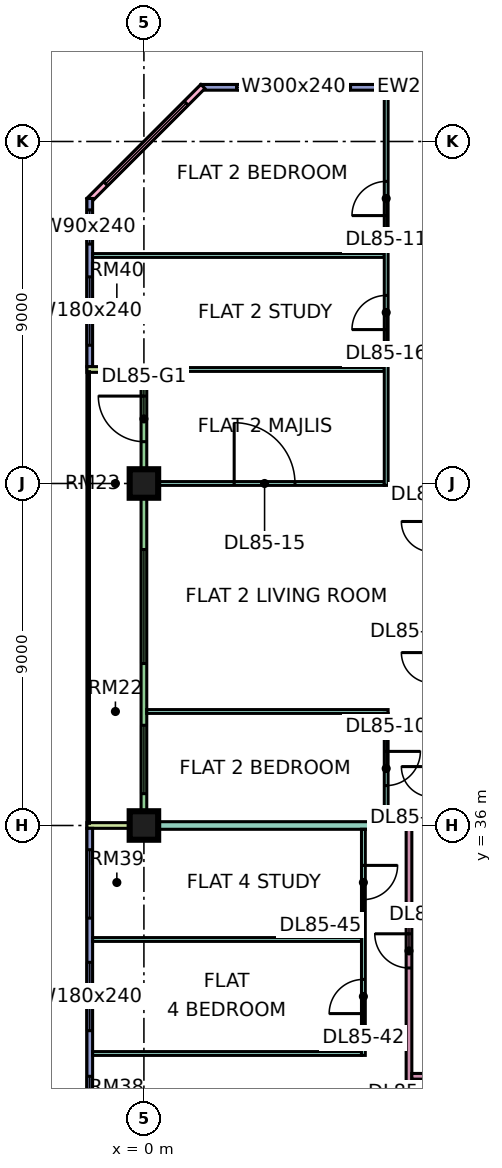
"""IFC4 building model, lengths in metres.
Left out: names, types, materials, properties, quantities, classifications, styles, units other than length and angle.
Written with IfcOpenShell. Run it as: python <this file> out.ifc"""

import sys

from ifc_helpers import new_model, si_unit, direction, frame, frame_2d, origin, origin_2d, place, context, subcontext, project, spatial, rectangle, extrude, element, fill, save


model = new_model("IFC4")
c1 = context("Model", 3, precision=1e-05, world=origin(), true_north=direction((0.0, 1.0)))
c2 = subcontext(c1, "Body", "Model", "MODEL_VIEW")
j1 = project(units=[si_unit("LENGTHUNIT", "METRE"), si_unit("PLANEANGLEUNIT", "RADIAN")], contexts=[c1])
p1 = place(None, origin())
s1 = spatial("IfcSite", under=j1, at=p1, CompositionType="ELEMENT")
p2 = place(p1, origin())
s2 = spatial("IfcBuilding", under=s1, at=p2, CompositionType="ELEMENT")
p3 = place(p2, frame((0.0, 0.0, 365.15)))
s3 = spatial("IfcBuildingStorey", under=s2, at=p3, CompositionType="ELEMENT", Elevation=365.15)
p4 = place(p3, frame((0.0, 36.0, 0.0), z_axis=(0.0, 0.0, 1.0), x_axis=(1.0, 0.0, 0.0)))
e1 = element("IfcColumn", 1, at=p4, inside=s3, PredefinedType="COLUMN", context=c2, shape_type="SweptSolid", body=[
    extrude(rectangle(XDim=0.75, YDim=0.75, at=origin_2d()), origin(), (0.0, 0.0, 1.0), 3.75),
])
p5 = place(p3, frame((0.0, 45.0, 0.0), z_axis=(0.0, 0.0, 1.0), x_axis=(1.0, 0.0, 0.0)))
e2 = element("IfcColumn", 2, at=p5, inside=s3, PredefinedType="COLUMN", context=c2, shape_type="SweptSolid", body=[
    extrude(rectangle(XDim=0.75, YDim=0.75, at=origin_2d()), origin(), (0.0, 0.0, 1.0), 3.75),
])
p6 = place(p3, frame((11.925, 55.425, 0.0), z_axis=(0.0, 0.0, 1.0), x_axis=(-1.0, 0.0, 0.0)))
e3 = element("IfcWall", 3, at=p6, inside=s3, PredefinedType="SOLIDWALL", context=c2, shape_type="SweptSolid", body=[
    extrude(rectangle(XDim=10.425, YDim=0.15, at=frame_2d((5.212, 0.0))), origin(), (0.0, 0.0, 1.0), 3.35),
])
p7 = place(p6, frame((0.675, 0.0, 0.45)))
e4 = element("IfcOpeningElement", 4, at=p7, cuts=e3, PredefinedType="OPENING", context=c2, shape_type="SweptSolid", body=[
    extrude(rectangle(XDim=3.0, YDim=2.4, at=frame_2d((1.5, 1.2))), frame((0.0, 0.085, 0.0), z_axis=(0.0, -1.0, 0.0), x_axis=(1.0, 0.0, 0.0)), (0.0, 0.0, 1.0), 0.17),
])
p8 = place(p6, frame((6.488, 0.0, 0.45)))
e5 = element("IfcOpeningElement", 5, at=p8, cuts=e3, PredefinedType="OPENING", context=c2, shape_type="SweptSolid", body=[
    extrude(rectangle(XDim=3.0, YDim=2.4, at=frame_2d((1.5, 1.2))), frame((0.0, 0.085, 0.0), z_axis=(0.0, -1.0, 0.0), x_axis=(1.0, 0.0, 0.0)), (0.0, 0.0, 1.0), 0.17),
])
p9 = place(p3, frame((1.553, 55.447, 0.0), z_axis=(0.0, 0.0, 1.0), x_axis=(-0.707106781187, -0.707106781187, 0.0)))
e6 = element("IfcWall", 6, at=p9, inside=s3, PredefinedType="SOLIDWALL", context=c2, shape_type="SweptSolid", body=[
    extrude(rectangle(XDim=4.243, YDim=0.15, at=frame_2d((2.121, 0.0))), origin(), (0.0, 0.0, 1.0), 3.35),
])
p10 = place(p9, frame((0.621, 0.0, 0.45)))
e7 = element("IfcOpeningElement", 7, at=p10, cuts=e6, PredefinedType="OPENING", context=c2, shape_type="SweptSolid", body=[
    extrude(rectangle(XDim=3.0, YDim=2.4, at=frame_2d((1.5, 1.2))), frame((0.0, 0.085, 0.0), z_axis=(0.0, -1.0, 0.0), x_axis=(1.0, 0.0, 0.0)), (0.0, 0.0, 1.0), 0.17),
])
p11 = place(p3, frame((-1.425, 52.5, 0.0), z_axis=(0.0, 0.0, 1.0), x_axis=(0.0, -1.0, 0.0)))
e8 = element("IfcWall", 8, at=p11, inside=s3, PredefinedType="SOLIDWALL", context=c2, shape_type="SweptSolid", body=[
    extrude(rectangle(XDim=4.425, YDim=0.15, at=frame_2d((2.212, 0.0))), origin(), (0.0, 0.0, 1.0), 3.35),
])
p12 = place(p11, frame((0.3, 0.0, 0.45)))
e9 = element("IfcOpeningElement", 9, at=p12, cuts=e8, PredefinedType="OPENING", context=c2, shape_type="SweptSolid", body=[
    extrude(rectangle(XDim=0.9, YDim=2.4, at=frame_2d((0.45, 1.2))), frame((0.0, 0.085, 0.0), z_axis=(0.0, -1.0, 0.0), x_axis=(1.0, 0.0, 0.0)), (0.0, 0.0, 1.0), 0.17),
])
p13 = place(p11, frame((2.062, 0.0, 0.45)))
e10 = element("IfcOpeningElement", 10, at=p13, cuts=e8, PredefinedType="OPENING", context=c2, shape_type="SweptSolid", body=[
    extrude(rectangle(XDim=1.8, YDim=2.4, at=frame_2d((0.9, 1.2))), frame((0.0, 0.085, 0.0), z_axis=(0.0, -1.0, 0.0), x_axis=(1.0, 0.0, 0.0)), (0.0, 0.0, 1.0), 0.17),
])
p14 = place(p3, frame((0.0, 47.925, 0.0), z_axis=(0.0, 0.0, 1.0), x_axis=(0.0, -1.0, 0.0)))
e11 = element("IfcWall", 11, at=p14, inside=s3, PredefinedType="SOLIDWALL", context=c2, shape_type="SweptSolid", body=[
    extrude(rectangle(XDim=11.85, YDim=0.15, at=frame_2d((5.925, 0.0))), origin(), (0.0, 0.0, 1.0), 3.35),
])
p15 = place(p14, frame((0.625, 0.0, 0.0)))
e12 = element("IfcOpeningElement", 12, at=p15, cuts=e11, PredefinedType="OPENING", context=c2, shape_type="SweptSolid", body=[
    extrude(rectangle(XDim=1.2, YDim=2.4, at=frame_2d((0.6, 1.2))), frame((0.0, 0.085, 0.0), z_axis=(0.0, -1.0, 0.0), x_axis=(1.0, 0.0, 0.0)), (0.0, 0.0, 1.0), 0.17),
])
p16 = place(p14, frame((4.663, 0.0, 0.45)))
e13 = element("IfcOpeningElement", 13, at=p16, cuts=e11, PredefinedType="OPENING", context=c2, shape_type="SweptSolid", body=[
    extrude(rectangle(XDim=3.0, YDim=2.4, at=frame_2d((1.5, 1.2))), frame((0.0, 0.085, 0.0), z_axis=(0.0, -1.0, 0.0), x_axis=(1.0, 0.0, 0.0)), (0.0, 0.0, 1.0), 0.17),
])
p17 = place(p14, frame((9.288, 0.0, 0.45)))
e14 = element("IfcOpeningElement", 14, at=p17, cuts=e11, PredefinedType="OPENING", context=c2, shape_type="SweptSolid", body=[
    extrude(rectangle(XDim=1.8, YDim=2.4, at=frame_2d((0.9, 1.2))), frame((0.0, 0.085, 0.0), z_axis=(0.0, -1.0, 0.0), x_axis=(1.0, 0.0, 0.0)), (0.0, 0.0, 1.0), 0.17),
])
for number, where, z_axis, x_axis in (
    (15, (-1.5, 48.0, 0.0), (0.0, 0.0, 1.0), (1.0, 0.0, 0.0)),
    (16, (-1.5, 36.0, 0.0), (0.0, 0.0, 1.0), (1.0, 0.0, 0.0)),
):
    element("IfcWall", number, at=place(p3, frame(where, z_axis=z_axis, x_axis=x_axis)), inside=s3, PredefinedType="SOLIDWALL", context=c2, shape_type="SweptSolid", body=[
        extrude(rectangle(XDim=1.5, YDim=0.15, at=frame_2d((0.75, 0.0))), origin(), (0.0, 0.0, 1.0), 3.35),
    ])
p18 = place(p3, frame((-1.425, 35.925, 0.0), z_axis=(0.0, 0.0, 1.0), x_axis=(0.0, -1.0, 0.0)))
e17 = element("IfcWall", 17, at=p18, inside=s3, PredefinedType="SOLIDWALL", context=c2, shape_type="SweptSolid", body=[
    extrude(rectangle(XDim=11.85, YDim=0.15, at=frame_2d((5.925, 0.0))), origin(), (0.0, 0.0, 1.0), 3.35),
])
p19 = place(p18, frame((0.562, 0.0, 0.45)))
e18 = element("IfcOpeningElement", 18, at=p19, cuts=e17, PredefinedType="OPENING", context=c2, shape_type="SweptSolid", body=[
    extrude(rectangle(XDim=1.8, YDim=2.4, at=frame_2d((0.9, 1.2))), frame((0.0, 0.085, 0.0), z_axis=(0.0, -1.0, 0.0), x_axis=(1.0, 0.0, 0.0)), (0.0, 0.0, 1.0), 0.17),
])
p20 = place(p18, frame((3.525, 0.0, 0.45)))
e19 = element("IfcOpeningElement", 19, at=p20, cuts=e17, PredefinedType="OPENING", context=c2, shape_type="SweptSolid", body=[
    extrude(rectangle(XDim=1.8, YDim=2.4, at=frame_2d((0.9, 1.2))), frame((0.0, 0.085, 0.0), z_axis=(0.0, -1.0, 0.0), x_axis=(1.0, 0.0, 0.0)), (0.0, 0.0, 1.0), 0.17),
])
p21 = place(p18, frame((6.525, 0.0, 0.45)))
e20 = element("IfcOpeningElement", 20, at=p21, cuts=e17, PredefinedType="OPENING", context=c2, shape_type="SweptSolid", body=[
    extrude(rectangle(XDim=1.8, YDim=2.4, at=frame_2d((0.9, 1.2))), frame((0.0, 0.085, 0.0), z_axis=(0.0, -1.0, 0.0), x_axis=(1.0, 0.0, 0.0)), (0.0, 0.0, 1.0), 0.17),
])
p22 = place(p18, frame((9.488, 0.0, 0.45)))
e21 = element("IfcOpeningElement", 21, at=p22, cuts=e17, PredefinedType="OPENING", context=c2, shape_type="SweptSolid", body=[
    extrude(rectangle(XDim=1.8, YDim=2.4, at=frame_2d((0.9, 1.2))), frame((0.0, 0.085, 0.0), z_axis=(0.0, -1.0, 0.0), x_axis=(1.0, 0.0, 0.0)), (0.0, 0.0, 1.0), 0.17),
])
for number, where, z_axis, x_axis in (
    (22, (-1.35, 30.0, 0.0), (0.0, 0.0, 1.0), (1.0, 0.0, 0.0)),
    (23, (-1.35, 33.0, 0.0), (0.0, 0.0, 1.0), (1.0, 0.0, 0.0)),
):
    element("IfcWall", number, at=place(p3, frame(where, z_axis=z_axis, x_axis=x_axis)), inside=s3, PredefinedType="PARTITIONING", context=c2, shape_type="SweptSolid", body=[
        extrude(rectangle(XDim=7.075, YDim=0.1, at=frame_2d((3.538, 0.0))), origin(), (0.0, 0.0, 1.0), 3.35),
    ])
e24 = element("IfcWall", 24, at=p4, inside=s3, PredefinedType="PARTITIONING", context=c2, shape_type="SweptSolid", body=[
    extrude(rectangle(XDim=12.275, YDim=0.2, at=frame_2d((6.137, 0.0))), origin(), (0.0, 0.0, 1.0), 3.35),
])
p23 = place(p3, frame((0.0, 48.0, 0.0), z_axis=(0.0, 0.0, 1.0), x_axis=(1.0, 0.0, 0.0)))
e25 = element("IfcWall", 25, at=p23, inside=s3, PredefinedType="PARTITIONING", context=c2, shape_type="SweptSolid", body=[
    extrude(rectangle(XDim=6.325, YDim=0.1, at=frame_2d((3.163, 0.0))), origin(), (0.0, 0.0, 1.0), 3.35),
])
p24 = place(p3, frame((-1.35, 51.0, 0.0), z_axis=(0.0, 0.0, 1.0), x_axis=(1.0, 0.0, 0.0)))
e26 = element("IfcWall", 26, at=p24, inside=s3, PredefinedType="PARTITIONING", context=c2, shape_type="SweptSolid", body=[
    extrude(rectangle(XDim=7.675, YDim=0.1, at=frame_2d((3.837, 0.0))), origin(), (0.0, 0.0, 1.0), 3.35),
])
p25 = place(p3, frame((0.074, 39.0, 0.0), z_axis=(0.0, 0.0, 1.0), x_axis=(1.0, 0.0, 0.0)))
e27 = element("IfcWall", 27, at=p25, inside=s3, PredefinedType="PARTITIONING", context=c2, shape_type="SweptSolid", body=[
    extrude(rectangle(XDim=6.351, YDim=0.1, at=frame_2d((3.176, 0.0))), origin(), (0.0, 0.0, 1.0), 3.35),
])
p26 = place(p3, frame((0.074, 45.0, 0.0), z_axis=(0.0, 0.0, 1.0), x_axis=(1.0, 0.0, 0.0)))
e28 = element("IfcWall", 28, at=p26, inside=s3, PredefinedType="PARTITIONING", context=c2, shape_type="SweptSolid", body=[
    extrude(rectangle(XDim=6.251, YDim=0.1, at=frame_2d((3.125, 0.0))), origin(), (0.0, 0.0, 1.0), 3.35),
])
p27 = place(p26, frame((2.301, 0.0, 0.0)))
e29 = element("IfcOpeningElement", 29, at=p27, cuts=e28, PredefinedType="OPENING", context=c2, shape_type="SweptSolid", body=[
    extrude(rectangle(XDim=1.6, YDim=2.1, at=frame_2d((0.8, 1.05))), frame((0.0, 0.06, 0.0), z_axis=(0.0, -1.0, 0.0), x_axis=(1.0, 0.0, 0.0)), (0.0, 0.0, 1.0), 0.12),
])
p28 = place(p3, frame((5.775, 29.95, 0.0), z_axis=(0.0, 0.0, 1.0), x_axis=(0.0, 1.0, 0.0)))
e30 = element("IfcWall", 30, at=p28, inside=s3, PredefinedType="PARTITIONING", context=c2, shape_type="SweptSolid", body=[
    extrude(rectangle(XDim=5.95, YDim=0.1, at=frame_2d((2.975, 0.0))), origin(), (0.0, 0.0, 1.0), 3.35),
])
p29 = place(p28, frame((1.1, 0.0, 0.0)))
e31 = element("IfcOpeningElement", 31, at=p29, cuts=e30, PredefinedType="OPENING", context=c2, shape_type="SweptSolid", body=[
    extrude(rectangle(XDim=0.9, YDim=2.1, at=frame_2d((0.45, 1.05))), frame((0.0, 0.06, 0.0), z_axis=(0.0, -1.0, 0.0), x_axis=(1.0, 0.0, 0.0)), (0.0, 0.0, 1.0), 0.12),
])
p30 = place(p28, frame((4.1, 0.0, 0.0)))
e32 = element("IfcOpeningElement", 32, at=p30, cuts=e30, PredefinedType="OPENING", context=c2, shape_type="SweptSolid", body=[
    extrude(rectangle(XDim=0.9, YDim=2.1, at=frame_2d((0.45, 1.05))), frame((0.0, 0.06, 0.0), z_axis=(0.0, -1.0, 0.0), x_axis=(1.0, 0.0, 0.0)), (0.0, 0.0, 1.0), 0.12),
])
p31 = place(p3, frame((6.375, 36.1, 0.0), z_axis=(0.0, 0.0, 1.0), x_axis=(0.0, 1.0, 0.0)))
e33 = element("IfcWall", 33, at=p31, inside=s3, PredefinedType="PARTITIONING", context=c2, shape_type="SweptSolid", body=[
    extrude(rectangle(XDim=2.85, YDim=0.1, at=frame_2d((1.425, 0.0))), origin(), (0.0, 0.0, 1.0), 3.35),
])
p32 = place(p31, frame((0.95, 0.0, 0.0)))
e34 = element("IfcOpeningElement", 34, at=p32, cuts=e33, PredefinedType="OPENING", context=c2, shape_type="SweptSolid", body=[
    extrude(rectangle(XDim=0.9, YDim=2.1, at=frame_2d((0.45, 1.05))), frame((0.0, 0.06, 0.0), z_axis=(0.0, -1.0, 0.0), x_axis=(1.0, 0.0, 0.0)), (0.0, 0.0, 1.0), 0.12),
])
p33 = place(p3, frame((6.375, 44.95, 0.0), z_axis=(0.0, 0.0, 1.0), x_axis=(0.0, 1.0, 0.0)))
e35 = element("IfcWall", 35, at=p33, inside=s3, PredefinedType="PARTITIONING", context=c2, shape_type="SweptSolid", body=[
    extrude(rectangle(XDim=10.4, YDim=0.1, at=frame_2d((5.2, 0.0))), origin(), (0.0, 0.0, 1.0), 3.35),
])
p34 = place(p33, frame((7.1, 0.0, 0.0)))
e36 = element("IfcOpeningElement", 36, at=p34, cuts=e35, PredefinedType="OPENING", context=c2, shape_type="SweptSolid", body=[
    extrude(rectangle(XDim=0.9, YDim=2.1, at=frame_2d((0.45, 1.05))), frame((0.0, 0.06, 0.0), z_axis=(0.0, -1.0, 0.0), x_axis=(1.0, 0.0, 0.0)), (0.0, 0.0, 1.0), 0.12),
])
p35 = place(p33, frame((4.1, 0.0, 0.0)))
e37 = element("IfcOpeningElement", 37, at=p35, cuts=e35, PredefinedType="OPENING", context=c2, shape_type="SweptSolid", body=[
    extrude(rectangle(XDim=0.9, YDim=2.1, at=frame_2d((0.45, 1.05))), frame((0.0, 0.06, 0.0), z_axis=(0.0, -1.0, 0.0), x_axis=(1.0, 0.0, 0.0)), (0.0, 0.0, 1.0), 0.12),
])
p36 = place(p3, frame((6.975, 26.325, 0.0), z_axis=(0.0, 0.0, 1.0), x_axis=(0.0, 1.0, 0.0)))
e38 = element("IfcWall", 38, at=p36, inside=s3, PredefinedType="PARTITIONING", context=c2, shape_type="SweptSolid", body=[
    extrude(rectangle(XDim=9.575, YDim=0.15, at=frame_2d((4.788, 0.0))), origin(), (0.0, 0.0, 1.0), 3.35),
])
p37 = place(p36, frame((1.125, 0.0, 0.0)))
e39 = element("IfcOpeningElement", 39, at=p37, cuts=e38, PredefinedType="OPENING", context=c2, shape_type="SweptSolid", body=[
    extrude(rectangle(XDim=0.8, YDim=2.1, at=frame_2d((0.4, 1.05))), frame((0.0, 0.085, 0.0), z_axis=(0.0, -1.0, 0.0), x_axis=(1.0, 0.0, 0.0)), (0.0, 0.0, 1.0), 0.17),
])
p38 = place(p36, frame((5.925, 0.0, 0.0)))
e40 = element("IfcOpeningElement", 40, at=p38, cuts=e38, PredefinedType="OPENING", context=c2, shape_type="SweptSolid", body=[
    extrude(rectangle(XDim=0.9, YDim=2.1, at=frame_2d((0.45, 1.05))), frame((0.0, 0.085, 0.0), z_axis=(0.0, -1.0, 0.0), x_axis=(1.0, 0.0, 0.0)), (0.0, 0.0, 1.0), 0.17),
])
p39 = place(p3, frame((7.05, 29.4, 0.0), z_axis=(0.0, 0.0, 1.0), x_axis=(1.0, 0.0, 0.0)))
e41 = element("IfcWall", 41, at=p39, inside=s3, PredefinedType="PARTITIONING", context=c2, shape_type="SweptSolid", body=[
    extrude(rectangle(XDim=5.225, YDim=0.15, at=frame_2d((2.612, 0.0))), origin(), (0.0, 0.0, 1.0), 3.35),
])
p40 = place(p8, origin())
e42 = element("IfcWindow", 42, at=p40, inside=s3, PartitioningType="SINGLE_PANEL", PredefinedType="WINDOW", context=c2, shape_type="SweptSolid", body=[
    extrude(rectangle(XDim=3.0, YDim=2.4, at=frame_2d((1.5, 1.2))), frame((0.0, 0.03, 0.0), z_axis=(0.0, -1.0, 0.0), x_axis=(1.0, 0.0, 0.0)), (0.0, 0.0, 1.0), 0.06),
])
fill(e5, e42)
p41 = place(p10, origin())
e43 = element("IfcWindow", 43, at=p41, inside=s3, PartitioningType="SINGLE_PANEL", PredefinedType="WINDOW", context=c2, shape_type="SweptSolid", body=[
    extrude(rectangle(XDim=3.0, YDim=2.4, at=frame_2d((1.5, 1.2))), frame((0.0, 0.03, 0.0), z_axis=(0.0, -1.0, 0.0), x_axis=(1.0, 0.0, 0.0)), (0.0, 0.0, 1.0), 0.06),
])
fill(e7, e43)
p42 = place(p12, origin())
e44 = element("IfcWindow", 44, at=p42, inside=s3, PartitioningType="SINGLE_PANEL", PredefinedType="WINDOW", context=c2, shape_type="SweptSolid", body=[
    extrude(rectangle(XDim=0.9, YDim=2.4, at=frame_2d((0.45, 1.2))), frame((0.0, 0.03, 0.0), z_axis=(0.0, -1.0, 0.0), x_axis=(1.0, 0.0, 0.0)), (0.0, 0.0, 1.0), 0.06),
])
fill(e9, e44)
p43 = place(p13, origin())
e45 = element("IfcWindow", 45, at=p43, inside=s3, PartitioningType="SINGLE_PANEL", PredefinedType="WINDOW", context=c2, shape_type="SweptSolid", body=[
    extrude(rectangle(XDim=1.8, YDim=2.4, at=frame_2d((0.9, 1.2))), frame((0.0, 0.03, 0.0), z_axis=(0.0, -1.0, 0.0), x_axis=(1.0, 0.0, 0.0)), (0.0, 0.0, 1.0), 0.06),
])
fill(e10, e45)
p44 = place(p15, frame((1.2, 0.0, 0.0), z_axis=(0.0, 0.0, 1.0), x_axis=(-1.0, 0.0, 0.0)))
e46 = element("IfcDoor", 46, at=p44, inside=s3, OperationType="DOUBLE_DOOR_SINGLE_SWING", PredefinedType="DOOR", context=c2, shape_type="SweptSolid", body=[
    extrude(rectangle(XDim=1.2, YDim=2.4, at=frame_2d((0.6, 1.2))), frame((0.0, 0.025, 0.0), z_axis=(0.0, -1.0, 0.0), x_axis=(1.0, 0.0, 0.0)), (0.0, 0.0, 1.0), 0.05),
])
fill(e12, e46)
p45 = place(p16, origin())
e47 = element("IfcWindow", 47, at=p45, inside=s3, PartitioningType="SINGLE_PANEL", PredefinedType="WINDOW", context=c2, shape_type="SweptSolid", body=[
    extrude(rectangle(XDim=3.0, YDim=2.4, at=frame_2d((1.5, 1.2))), frame((0.0, 0.03, 0.0), z_axis=(0.0, -1.0, 0.0), x_axis=(1.0, 0.0, 0.0)), (0.0, 0.0, 1.0), 0.06),
])
fill(e13, e47)
p46 = place(p17, origin())
e48 = element("IfcWindow", 48, at=p46, inside=s3, PartitioningType="SINGLE_PANEL", PredefinedType="WINDOW", context=c2, shape_type="SweptSolid", body=[
    extrude(rectangle(XDim=1.8, YDim=2.4, at=frame_2d((0.9, 1.2))), frame((0.0, 0.03, 0.0), z_axis=(0.0, -1.0, 0.0), x_axis=(1.0, 0.0, 0.0)), (0.0, 0.0, 1.0), 0.06),
])
fill(e14, e48)
p47 = place(p19, origin())
e49 = element("IfcWindow", 49, at=p47, inside=s3, PartitioningType="SINGLE_PANEL", PredefinedType="WINDOW", context=c2, shape_type="SweptSolid", body=[
    extrude(rectangle(XDim=1.8, YDim=2.4, at=frame_2d((0.9, 1.2))), frame((0.0, 0.03, 0.0), z_axis=(0.0, -1.0, 0.0), x_axis=(1.0, 0.0, 0.0)), (0.0, 0.0, 1.0), 0.06),
])
fill(e18, e49)
p48 = place(p20, origin())
e50 = element("IfcWindow", 50, at=p48, inside=s3, PartitioningType="SINGLE_PANEL", PredefinedType="WINDOW", context=c2, shape_type="SweptSolid", body=[
    extrude(rectangle(XDim=1.8, YDim=2.4, at=frame_2d((0.9, 1.2))), frame((0.0, 0.03, 0.0), z_axis=(0.0, -1.0, 0.0), x_axis=(1.0, 0.0, 0.0)), (0.0, 0.0, 1.0), 0.06),
])
fill(e19, e50)
p49 = place(p21, origin())
e51 = element("IfcWindow", 51, at=p49, inside=s3, PartitioningType="SINGLE_PANEL", PredefinedType="WINDOW", context=c2, shape_type="SweptSolid", body=[
    extrude(rectangle(XDim=1.8, YDim=2.4, at=frame_2d((0.9, 1.2))), frame((0.0, 0.03, 0.0), z_axis=(0.0, -1.0, 0.0), x_axis=(1.0, 0.0, 0.0)), (0.0, 0.0, 1.0), 0.06),
])
fill(e20, e51)
p50 = place(p32, origin())
e52 = element("IfcDoor", 52, at=p50, inside=s3, OperationType="SINGLE_SWING_RIGHT", PredefinedType="DOOR", context=c2, shape_type="SweptSolid", body=[
    extrude(rectangle(XDim=0.9, YDim=2.1, at=frame_2d((0.45, 1.05))), frame((0.0, 0.025, 0.0), z_axis=(0.0, -1.0, 0.0), x_axis=(1.0, 0.0, 0.0)), (0.0, 0.0, 1.0), 0.05),
])
fill(e34, e52)
p51 = place(p34, origin())
e53 = element("IfcDoor", 53, at=p51, inside=s3, OperationType="SINGLE_SWING_LEFT", PredefinedType="DOOR", context=c2, shape_type="SweptSolid", body=[
    extrude(rectangle(XDim=0.9, YDim=2.1, at=frame_2d((0.45, 1.05))), frame((0.0, 0.025, 0.0), z_axis=(0.0, -1.0, 0.0), x_axis=(1.0, 0.0, 0.0)), (0.0, 0.0, 1.0), 0.05),
])
fill(e36, e53)
p52 = place(p27, origin())
e54 = element("IfcDoor", 54, at=p52, inside=s3, OperationType="DOUBLE_DOOR_SINGLE_SWING", PredefinedType="DOOR", context=c2, shape_type="SweptSolid", body=[
    extrude(rectangle(XDim=1.6, YDim=2.1, at=frame_2d((0.8, 1.05))), frame((0.0, 0.025, 0.0), z_axis=(0.0, -1.0, 0.0), x_axis=(1.0, 0.0, 0.0)), (0.0, 0.0, 1.0), 0.05),
])
fill(e29, e54)
p53 = place(p35, origin())
e55 = element("IfcDoor", 55, at=p53, inside=s3, OperationType="SINGLE_SWING_LEFT", PredefinedType="DOOR", context=c2, shape_type="SweptSolid", body=[
    extrude(rectangle(XDim=0.9, YDim=2.1, at=frame_2d((0.45, 1.05))), frame((0.0, 0.025, 0.0), z_axis=(0.0, -1.0, 0.0), x_axis=(1.0, 0.0, 0.0)), (0.0, 0.0, 1.0), 0.05),
])
fill(e37, e55)
p54 = place(p29, origin())
e56 = element("IfcDoor", 56, at=p54, inside=s3, OperationType="SINGLE_SWING_LEFT", PredefinedType="DOOR", context=c2, shape_type="SweptSolid", body=[
    extrude(rectangle(XDim=0.9, YDim=2.1, at=frame_2d((0.45, 1.05))), frame((0.0, 0.025, 0.0), z_axis=(0.0, -1.0, 0.0), x_axis=(1.0, 0.0, 0.0)), (0.0, 0.0, 1.0), 0.05),
])
fill(e31, e56)
p55 = place(p38, frame((0.9, 0.0, 0.0), z_axis=(0.0, 0.0, 1.0), x_axis=(-1.0, 0.0, 0.0)))
e57 = element("IfcDoor", 57, at=p55, inside=s3, OperationType="SINGLE_SWING_RIGHT", PredefinedType="DOOR", context=c2, shape_type="SweptSolid", body=[
    extrude(rectangle(XDim=0.9, YDim=2.1, at=frame_2d((0.45, 1.05))), frame((0.0, 0.025, 0.0), z_axis=(0.0, -1.0, 0.0), x_axis=(1.0, 0.0, 0.0)), (0.0, 0.0, 1.0), 0.05),
])
fill(e40, e57)
p56 = place(p30, origin())
e58 = element("IfcDoor", 58, at=p56, inside=s3, OperationType="SINGLE_SWING_RIGHT", PredefinedType="DOOR", context=c2, shape_type="SweptSolid", body=[
    extrude(rectangle(XDim=0.9, YDim=2.1, at=frame_2d((0.45, 1.05))), frame((0.0, 0.025, 0.0), z_axis=(0.0, -1.0, 0.0), x_axis=(1.0, 0.0, 0.0)), (0.0, 0.0, 1.0), 0.05),
])
fill(e32, e58)
save(model, sys.argv[1])
